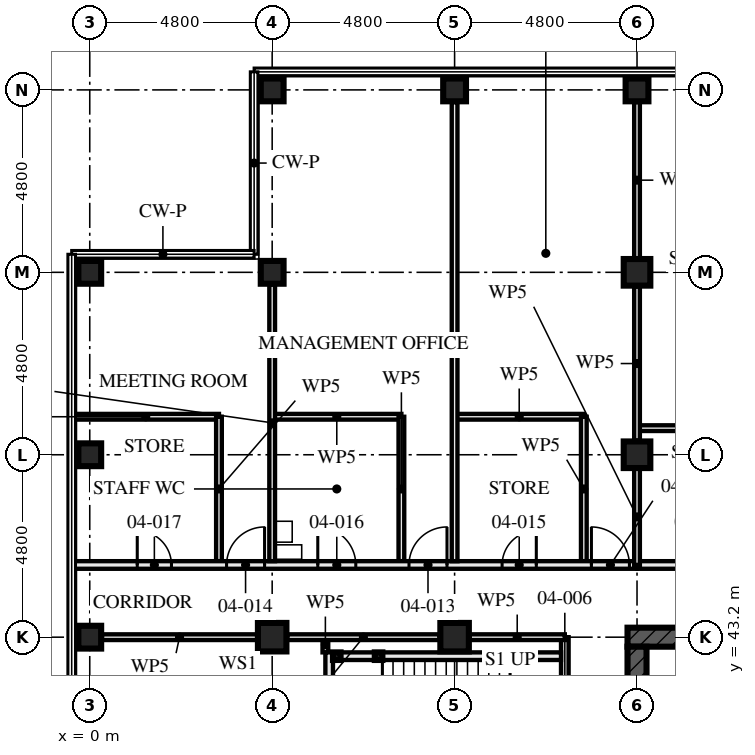
"""IFC4 building model, lengths in metres.
Left out: names, types, materials, properties, quantities, classifications, styles, units other than length and angle.
Written with IfcOpenShell. Run it as: python <this file> out.ifc"""

import sys

from ifc_helpers import new_model, si_unit, direction, frame, frame_2d, origin, origin_2d, place, context, subcontext, project, spatial, rectangle, hollow_rectangle, extrude, element, fill, save


model = new_model("IFC4")
c1 = context("Model", 3, precision=1e-05, world=origin(), true_north=direction((0.0, 1.0)))
c2 = subcontext(c1, "Body", "Model", "MODEL_VIEW")
j1 = project(units=[si_unit("LENGTHUNIT", "METRE"), si_unit("PLANEANGLEUNIT", "RADIAN")], contexts=[c1])
p1 = place(None, origin())
s1 = spatial("IfcSite", under=j1, at=p1, CompositionType="ELEMENT")
p2 = place(p1, origin())
s2 = spatial("IfcBuilding", under=s1, at=p2, CompositionType="ELEMENT")
p3 = place(p2, frame((0.0, 0.0, 18.0)))
s3 = spatial("IfcBuildingStorey", under=s2, at=p3, CompositionType="ELEMENT", Elevation=18.0)
for number, where, z_axis, x_axis in (
    (1, (0.0, 43.2, 0.0), (0.0, 0.0, 1.0), (0.0, 1.0, 0.0)),
    (2, (0.0, 48.0, 0.0), (0.0, 0.0, 1.0), (1.0, 0.0, 0.0)),
    (3, (0.0, 52.8, 0.0), (0.0, 0.0, 1.0), (0.0, 1.0, 0.0)),
):
    element("IfcColumn", number, at=place(p3, frame(where, z_axis=z_axis, x_axis=x_axis)), inside=s3, PredefinedType="COLUMN", context=c2, shape_type="SweptSolid", body=[
        extrude(hollow_rectangle(XDim=0.6, YDim=0.6, WallThickness=0.08, at=origin_2d()), origin(), (0.0, 0.0, 1.0), 4.5),
    ])
p4 = place(p3, frame((4.8, 43.2, 0.0), z_axis=(0.0, 0.0, 1.0), x_axis=(0.0, 1.0, 0.0)))
e4 = element("IfcColumn", 4, at=p4, inside=s3, PredefinedType="COLUMN", context=c2, shape_type="SweptSolid", body=[
    extrude(hollow_rectangle(XDim=0.75, YDim=0.75, WallThickness=0.08, at=origin_2d()), origin(), (0.0, 0.0, 1.0), 4.5),
])
for number, where, z_axis, x_axis in (
    (5, (4.8, 52.8, 0.0), (0.0, 0.0, 1.0), (0.0, 1.0, 0.0)),
    (6, (4.8, 57.6, 0.0), (0.0, 0.0, 1.0), (0.0, 1.0, 0.0)),
):
    element("IfcColumn", number, at=place(p3, frame(where, z_axis=z_axis, x_axis=x_axis)), inside=s3, PredefinedType="COLUMN", context=c2, shape_type="SweptSolid", body=[
        extrude(hollow_rectangle(XDim=0.6, YDim=0.6, WallThickness=0.08, at=origin_2d()), origin(), (0.0, 0.0, 1.0), 4.5),
    ])
p5 = place(p3, frame((9.6, 43.2, 0.0), z_axis=(0.0, 0.0, 1.0), x_axis=(0.0, 1.0, 0.0)))
e7 = element("IfcColumn", 7, at=p5, inside=s3, PredefinedType="COLUMN", context=c2, shape_type="SweptSolid", body=[
    extrude(hollow_rectangle(XDim=0.75, YDim=0.75, WallThickness=0.08, at=origin_2d()), origin(), (0.0, 0.0, 1.0), 4.5),
])
p6 = place(p3, frame((9.6, 57.6, 0.0), z_axis=(0.0, 0.0, 1.0), x_axis=(0.0, 1.0, 0.0)))
e8 = element("IfcColumn", 8, at=p6, inside=s3, PredefinedType="COLUMN", context=c2, shape_type="SweptSolid", body=[
    extrude(hollow_rectangle(XDim=0.6, YDim=0.6, WallThickness=0.08, at=origin_2d()), origin(), (0.0, 0.0, 1.0), 4.5),
])
for number, where, z_axis, x_axis in (
    (9, (14.4, 48.0, 0.0), (0.0, 0.0, 1.0), (1.0, 0.0, 0.0)),
    (10, (14.4, 52.8, 0.0), (0.0, 0.0, 1.0), (1.0, 0.0, 0.0)),
):
    element("IfcColumn", number, at=place(p3, frame(where, z_axis=z_axis, x_axis=x_axis)), inside=s3, PredefinedType="COLUMN", context=c2, shape_type="SweptSolid", body=[
        extrude(hollow_rectangle(XDim=0.7, YDim=0.7, WallThickness=0.06, at=origin_2d()), origin(), (0.0, 0.0, 1.0), 4.5),
    ])
p7 = place(p3, frame((14.4, 57.6, 0.0), z_axis=(0.0, 0.0, 1.0), x_axis=(0.0, 1.0, 0.0)))
e11 = element("IfcColumn", 11, at=p7, inside=s3, PredefinedType="COLUMN", context=c2, shape_type="SweptSolid", body=[
    extrude(hollow_rectangle(XDim=0.6, YDim=0.6, WallThickness=0.08, at=origin_2d()), origin(), (0.0, 0.0, 1.0), 4.5),
])
p8 = place(p3, frame((29.05, 43.2, -0.17), z_axis=(0.0, 0.0, 1.0), x_axis=(-1.0, 0.0, 0.0)))
e12 = element("IfcWall", 12, at=p8, inside=s3, PredefinedType="SHEAR", context=c2, shape_type="SweptSolid", body=[
    extrude(rectangle(XDim=14.9, YDim=0.5, at=frame_2d((7.45, 0.0))), origin(), (0.0, 0.0, 1.0), 4.5),
])
p9 = place(p8, frame((6.85, 0.0, 0.17)))
e13 = element("IfcOpeningElement", 13, at=p9, cuts=e12, PredefinedType="OPENING", context=c2, shape_type="SweptSolid", body=[
    extrude(rectangle(XDim=1.2, YDim=2.1, at=frame_2d((0.6, 1.05))), frame((0.0, 0.26, 0.0), z_axis=(0.0, -1.0, 0.0), x_axis=(1.0, 0.0, 0.0)), (0.0, 0.0, 1.0), 0.521),
])
p10 = place(p3, frame((14.4, 42.95, -0.17), z_axis=(0.0, 0.0, 1.0), x_axis=(0.0, -1.0, 0.0)))
e14 = element("IfcWall", 14, at=p10, inside=s3, PredefinedType="SHEAR", context=c2, shape_type="SweptSolid", body=[
    extrude(rectangle(XDim=13.9, YDim=0.5, at=frame_2d((6.95, 0.0))), origin(), (0.0, 0.0, 1.0), 4.5),
])
p11 = place(p10, frame((6.35, 0.0, 0.17)))
e15 = element("IfcOpeningElement", 15, at=p11, cuts=e14, PredefinedType="OPENING", context=c2, shape_type="SweptSolid", body=[
    extrude(rectangle(XDim=1.2, YDim=2.1, at=frame_2d((0.6, 1.05))), frame((0.0, 0.26, 0.0), z_axis=(0.0, -1.0, 0.0), x_axis=(1.0, 0.0, 0.0)), (0.0, 0.0, 1.0), 0.521),
])
for number, where, z_axis, x_axis in (
    (16, (6.5, 42.7, 0.0), (0.0, 0.0, 1.0), (1.0, 0.0, 0.0)),
    (17, (7.6, 42.7, 0.0), (0.0, 0.0, 1.0), (1.0, 0.0, 0.0)),
):
    element("IfcColumn", number, at=place(p3, frame(where, z_axis=z_axis, x_axis=x_axis)), inside=s3, PredefinedType="COLUMN", context=c2, shape_type="SweptSolid", body=[
        extrude(hollow_rectangle(XDim=0.2, YDim=0.2, WallThickness=0.008, at=origin_2d()), origin(), (0.0, 0.0, 1.0), 4.33),
    ])
p12 = place(p3, frame((6.6, 42.7, 0.0), z_axis=(0.0, 0.0, 1.0), x_axis=(1.0, 0.0, 0.0)))
e18 = element("IfcWall", 18, at=p12, inside=s3, PredefinedType="SOLIDWALL", context=c2, shape_type="SweptSolid", body=[
    extrude(rectangle(XDim=0.9, YDim=0.2, at=frame_2d((0.45, 0.0))), origin(), (0.0, 0.0, 1.0), 3.99),
])
p13 = place(p3, frame((7.7, 42.7, 0.0), z_axis=(0.0, 0.0, 1.0), x_axis=(1.0, 0.0, 0.0)))
e19 = element("IfcWall", 19, at=p13, inside=s3, PredefinedType="SOLIDWALL", context=c2, shape_type="SweptSolid", body=[
    extrude(rectangle(XDim=4.7, YDim=0.2, at=frame_2d((2.35, 0.0))), origin(), (0.0, 0.0, 1.0), 3.99),
])
p14 = place(p3, frame((6.3, 42.8, 0.0), z_axis=(0.0, 0.0, 1.0), x_axis=(0.0, -1.0, 0.0)))
e20 = element("IfcWall", 20, at=p14, inside=s3, PredefinedType="SOLIDWALL", context=c2, shape_type="SweptSolid", body=[
    extrude(rectangle(XDim=3.0, YDim=0.2, at=frame_2d((1.5, 0.0))), origin(), (0.0, 0.0, 1.0), 4.33),
])
p15 = place(p3, frame((6.2, 43.2, 0.0), z_axis=(0.0, 0.0, 1.0), x_axis=(0.0, -1.0, 0.0)))
e21 = element("IfcWall", 21, at=p15, inside=s3, PredefinedType="PARTITIONING", context=c2, shape_type="SweptSolid", body=[
    extrude(rectangle(XDim=0.4, YDim=0.15, at=frame_2d((0.2, 0.0))), origin(), (0.0, 0.0, 1.0), 4.33),
])
p16 = place(p3, frame((12.5, 43.2, 0.0), z_axis=(0.0, 0.0, 1.0), x_axis=(0.0, -1.0, 0.0)))
e22 = element("IfcWall", 22, at=p16, inside=s3, PredefinedType="PARTITIONING", context=c2, shape_type="SweptSolid", body=[
    extrude(rectangle(XDim=14.4, YDim=0.2, at=frame_2d((7.2, 0.0))), origin(), (0.0, 0.0, 1.0), 3.55),
])
p17 = place(p16, frame((1.4, 0.0, 0.0)))
e23 = element("IfcOpeningElement", 23, at=p17, cuts=e22, PredefinedType="OPENING", context=c2, shape_type="SweptSolid", body=[
    extrude(rectangle(XDim=1.0, YDim=2.1, at=frame_2d((0.5, 1.05))), frame((0.0, 0.111, 0.0), z_axis=(0.0, -1.0, 0.0), x_axis=(1.0, 0.0, 0.0)), (0.0, 0.0, 1.0), 0.221),
])
p18 = place(p16, frame((3.6, 0.0, 0.0)))
e24 = element("IfcOpeningElement", 24, at=p18, cuts=e22, PredefinedType="OPENING", context=c2, shape_type="SweptSolid", body=[
    extrude(rectangle(XDim=1.0, YDim=2.4, at=frame_2d((0.5, 1.2))), frame((0.0, 0.111, 0.0), z_axis=(0.0, -1.0, 0.0), x_axis=(1.0, 0.0, 0.0)), (0.0, 0.0, 1.0), 0.221),
])
p19 = place(p16, frame((5.0, 0.0, 0.0)))
e25 = element("IfcOpeningElement", 25, at=p19, cuts=e22, PredefinedType="OPENING", context=c2, shape_type="SweptSolid", body=[
    extrude(rectangle(XDim=1.0, YDim=2.4, at=frame_2d((0.5, 1.2))), frame((0.0, 0.111, 0.0), z_axis=(0.0, -1.0, 0.0), x_axis=(1.0, 0.0, 0.0)), (0.0, 0.0, 1.0), 0.221),
])
p20 = place(p16, frame((9.8, 0.0, 0.0)))
e26 = element("IfcOpeningElement", 26, at=p20, cuts=e22, PredefinedType="OPENING", context=c2, shape_type="SweptSolid", body=[
    extrude(rectangle(XDim=1.0, YDim=2.4, at=frame_2d((0.5, 1.2))), frame((0.0, 0.111, 0.0), z_axis=(0.0, -1.0, 0.0), x_axis=(1.0, 0.0, 0.0)), (0.0, 0.0, 1.0), 0.221),
])
p21 = place(p16, frame((7.45, 0.0, 0.0)))
e27 = element("IfcOpeningElement", 27, at=p21, cuts=e22, PredefinedType="OPENING", context=c2, shape_type="SweptSolid", body=[
    extrude(rectangle(XDim=0.9, YDim=2.1, at=frame_2d((0.45, 1.05))), frame((0.0, 0.111, 0.0), z_axis=(0.0, -1.0, 0.0), x_axis=(1.0, 0.0, 0.0)), (0.0, 0.0, 1.0), 0.221),
])
p22 = place(p16, frame((12.2, 0.0, 0.0)))
e28 = element("IfcOpeningElement", 28, at=p22, cuts=e22, PredefinedType="OPENING", context=c2, shape_type="SweptSolid", body=[
    extrude(rectangle(XDim=1.0, YDim=2.1, at=frame_2d((0.5, 1.05))), frame((0.0, 0.111, 0.0), z_axis=(0.0, -1.0, 0.0), x_axis=(1.0, 0.0, 0.0)), (0.0, 0.0, 1.0), 0.221),
])
p23 = place(p3, frame((13.0, 49.0, 0.0), z_axis=(0.0, 0.0, 1.0), x_axis=(0.0, -1.0, 0.0)))
e29 = element("IfcWall", 29, at=p23, inside=s3, PredefinedType="PARTITIONING", context=c2, shape_type="SweptSolid", body=[
    extrude(rectangle(XDim=3.8, YDim=0.15, at=frame_2d((1.9, 0.0))), origin(), (0.0, 0.0, 1.0), 3.55),
])
p24 = place(p3, frame((13.0, 49.0, 0.0), z_axis=(0.0, 0.0, 1.0), x_axis=(-1.0, 0.0, 0.0)))
e30 = element("IfcWall", 30, at=p24, inside=s3, PredefinedType="PARTITIONING", context=c2, shape_type="SweptSolid", body=[
    extrude(rectangle(XDim=3.4, YDim=0.15, at=frame_2d((1.7, 0.0))), origin(), (0.0, 0.0, 1.0), 4.33),
])
p25 = place(p3, frame((8.2, 49.0, 0.0), z_axis=(0.0, 0.0, 1.0), x_axis=(0.0, -1.0, 0.0)))
e31 = element("IfcWall", 31, at=p25, inside=s3, PredefinedType="PARTITIONING", context=c2, shape_type="SweptSolid", body=[
    extrude(rectangle(XDim=3.8, YDim=0.15, at=frame_2d((1.9, 0.0))), origin(), (0.0, 0.0, 1.0), 3.55),
])
p26 = place(p3, frame((8.2, 49.0, 0.0), z_axis=(0.0, 0.0, 1.0), x_axis=(-1.0, 0.0, 0.0)))
e32 = element("IfcWall", 32, at=p26, inside=s3, PredefinedType="PARTITIONING", context=c2, shape_type="SweptSolid", body=[
    extrude(rectangle(XDim=3.4, YDim=0.15, at=frame_2d((1.7, 0.0))), origin(), (0.0, 0.0, 1.0), 4.33),
])
p27 = place(p3, frame((3.4, 49.0, 0.0), z_axis=(0.0, 0.0, 1.0), x_axis=(0.0, -1.0, 0.0)))
e33 = element("IfcWall", 33, at=p27, inside=s3, PredefinedType="PARTITIONING", context=c2, shape_type="SweptSolid", body=[
    extrude(rectangle(XDim=3.8, YDim=0.15, at=frame_2d((1.9, 0.0))), origin(), (0.0, 0.0, 1.0), 3.55),
])
p28 = place(p3, frame((3.4, 49.0, 0.0), z_axis=(0.0, 0.0, 1.0), x_axis=(-1.0, 0.0, 0.0)))
e34 = element("IfcWall", 34, at=p28, inside=s3, PredefinedType="PARTITIONING", context=c2, shape_type="SweptSolid", body=[
    extrude(rectangle(XDim=3.855, YDim=0.15, at=frame_2d((1.927, 0.0))), origin(), (0.0, 0.0, 1.0), 3.32),
])
p29 = place(p3, frame((9.6, 57.28, 0.0), z_axis=(0.0, 0.0, 1.0), x_axis=(0.0, -1.0, 0.0)))
e35 = element("IfcWall", 35, at=p29, inside=s3, PredefinedType="PARTITIONING", context=c2, shape_type="SweptSolid", body=[
    extrude(rectangle(XDim=12.08, YDim=0.15, at=frame_2d((6.04, 0.0))), origin(), (0.0, 0.0, 1.0), 3.55),
])
p30 = place(p3, frame((4.8, 52.48, 0.0), z_axis=(0.0, 0.0, 1.0), x_axis=(0.0, -1.0, 0.0)))
e36 = element("IfcWall", 36, at=p30, inside=s3, PredefinedType="PARTITIONING", context=c2, shape_type="SweptSolid", body=[
    extrude(rectangle(XDim=7.28, YDim=0.15, at=frame_2d((3.64, 0.0))), origin(), (0.0, 0.0, 1.0), 3.55),
])
p31 = place(p3, frame((14.4, 45.1, 0.0), z_axis=(0.0, 0.0, 1.0), x_axis=(-1.0, 0.0, 0.0)))
e37 = element("IfcWall", 37, at=p31, inside=s3, PredefinedType="PARTITIONING", context=c2, shape_type="SweptSolid", body=[
    extrude(rectangle(XDim=14.855, YDim=0.2, at=frame_2d((7.427, 0.0))), origin(), (0.0, 0.0, 1.0), 3.32),
])
p32 = place(p31, frame((0.2, 0.0, 0.0)))
e38 = element("IfcOpeningElement", 38, at=p32, cuts=e37, PredefinedType="OPENING", context=c2, shape_type="SweptSolid", body=[
    extrude(rectangle(XDim=1.0, YDim=2.4, at=frame_2d((0.5, 1.2))), frame((0.0, 0.111, 0.0), z_axis=(0.0, -1.0, 0.0), x_axis=(1.0, 0.0, 0.0)), (0.0, 0.0, 1.0), 0.221),
])
p33 = place(p31, frame((5.0, 0.0, 0.0)))
e39 = element("IfcOpeningElement", 39, at=p33, cuts=e37, PredefinedType="OPENING", context=c2, shape_type="SweptSolid", body=[
    extrude(rectangle(XDim=1.0, YDim=2.4, at=frame_2d((0.5, 1.2))), frame((0.0, 0.111, 0.0), z_axis=(0.0, -1.0, 0.0), x_axis=(1.0, 0.0, 0.0)), (0.0, 0.0, 1.0), 0.221),
])
p34 = place(p31, frame((9.8, 0.0, 0.0)))
e40 = element("IfcOpeningElement", 40, at=p34, cuts=e37, PredefinedType="OPENING", context=c2, shape_type="SweptSolid", body=[
    extrude(rectangle(XDim=1.0, YDim=2.4, at=frame_2d((0.5, 1.2))), frame((0.0, 0.111, 0.0), z_axis=(0.0, -1.0, 0.0), x_axis=(1.0, 0.0, 0.0)), (0.0, 0.0, 1.0), 0.221),
])
p35 = place(p31, frame((2.65, 0.0, 0.0)))
e41 = element("IfcOpeningElement", 41, at=p35, cuts=e37, PredefinedType="OPENING", context=c2, shape_type="SweptSolid", body=[
    extrude(rectangle(XDim=0.9, YDim=2.1, at=frame_2d((0.45, 1.05))), frame((0.0, 0.111, 0.0), z_axis=(0.0, -1.0, 0.0), x_axis=(1.0, 0.0, 0.0)), (0.0, 0.0, 1.0), 0.221),
])
p36 = place(p31, frame((7.4, 0.0, 0.0)))
e42 = element("IfcOpeningElement", 42, at=p36, cuts=e37, PredefinedType="OPENING", context=c2, shape_type="SweptSolid", body=[
    extrude(rectangle(XDim=1.0, YDim=2.1, at=frame_2d((0.5, 1.05))), frame((0.0, 0.111, 0.0), z_axis=(0.0, -1.0, 0.0), x_axis=(1.0, 0.0, 0.0)), (0.0, 0.0, 1.0), 0.221),
])
p37 = place(p31, frame((12.25, 0.0, 0.0)))
e43 = element("IfcOpeningElement", 43, at=p37, cuts=e37, PredefinedType="OPENING", context=c2, shape_type="SweptSolid", body=[
    extrude(rectangle(XDim=0.9, YDim=2.1, at=frame_2d((0.45, 1.05))), frame((0.0, 0.111, 0.0), z_axis=(0.0, -1.0, 0.0), x_axis=(1.0, 0.0, 0.0)), (0.0, 0.0, 1.0), 0.221),
])
p38 = place(p3, frame((17.8, 48.7, 0.0), z_axis=(0.0, 0.0, 1.0), x_axis=(-1.0, 0.0, 0.0)))
e44 = element("IfcWall", 44, at=p38, inside=s3, PredefinedType="PARTITIONING", context=c2, shape_type="SweptSolid", body=[
    extrude(rectangle(XDim=3.4, YDim=0.15, at=frame_2d((1.7, 0.0))), origin(), (0.0, 0.0, 1.0), 4.33),
])
p39 = place(p3, frame((28.8, 45.1, 0.0), z_axis=(0.0, 0.0, 1.0), x_axis=(-1.0, 0.0, 0.0)))
e45 = element("IfcWall", 45, at=p39, inside=s3, PredefinedType="PARTITIONING", context=c2, shape_type="SweptSolid", body=[
    extrude(rectangle(XDim=14.4, YDim=0.2, at=frame_2d((7.2, 0.0))), origin(), (0.0, 0.0, 1.0), 4.33),
])
p40 = place(p39, frame((0.2, 0.0, 0.0)))
e46 = element("IfcOpeningElement", 46, at=p40, cuts=e45, PredefinedType="OPENING", context=c2, shape_type="SweptSolid", body=[
    extrude(rectangle(XDim=1.0, YDim=2.4, at=frame_2d((0.5, 1.2))), frame((0.0, 0.111, 0.0), z_axis=(0.0, -1.0, 0.0), x_axis=(1.0, 0.0, 0.0)), (0.0, 0.0, 1.0), 0.221),
])
p41 = place(p39, frame((5.0, 0.0, 0.0)))
e47 = element("IfcOpeningElement", 47, at=p41, cuts=e45, PredefinedType="OPENING", context=c2, shape_type="SweptSolid", body=[
    extrude(rectangle(XDim=1.0, YDim=2.4, at=frame_2d((0.5, 1.2))), frame((0.0, 0.111, 0.0), z_axis=(0.0, -1.0, 0.0), x_axis=(1.0, 0.0, 0.0)), (0.0, 0.0, 1.0), 0.221),
])
p42 = place(p39, frame((9.8, 0.0, 0.0)))
e48 = element("IfcOpeningElement", 48, at=p42, cuts=e45, PredefinedType="OPENING", context=c2, shape_type="SweptSolid", body=[
    extrude(rectangle(XDim=1.0, YDim=2.4, at=frame_2d((0.5, 1.2))), frame((0.0, 0.111, 0.0), z_axis=(0.0, -1.0, 0.0), x_axis=(1.0, 0.0, 0.0)), (0.0, 0.0, 1.0), 0.221),
])
p43 = place(p39, frame((2.65, 0.0, 0.0)))
e49 = element("IfcOpeningElement", 49, at=p43, cuts=e45, PredefinedType="OPENING", context=c2, shape_type="SweptSolid", body=[
    extrude(rectangle(XDim=0.9, YDim=2.1, at=frame_2d((0.45, 1.05))), frame((0.0, 0.111, 0.0), z_axis=(0.0, -1.0, 0.0), x_axis=(1.0, 0.0, 0.0)), (0.0, 0.0, 1.0), 0.221),
])
p44 = place(p39, frame((7.4, 0.0, 0.0)))
e50 = element("IfcOpeningElement", 50, at=p44, cuts=e45, PredefinedType="OPENING", context=c2, shape_type="SweptSolid", body=[
    extrude(rectangle(XDim=1.0, YDim=2.1, at=frame_2d((0.5, 1.05))), frame((0.0, 0.111, 0.0), z_axis=(0.0, -1.0, 0.0), x_axis=(1.0, 0.0, 0.0)), (0.0, 0.0, 1.0), 0.221),
])
p45 = place(p39, frame((12.25, 0.0, 0.0)))
e51 = element("IfcOpeningElement", 51, at=p45, cuts=e45, PredefinedType="OPENING", context=c2, shape_type="SweptSolid", body=[
    extrude(rectangle(XDim=0.9, YDim=2.1, at=frame_2d((0.45, 1.05))), frame((0.0, 0.111, 0.0), z_axis=(0.0, -1.0, 0.0), x_axis=(1.0, 0.0, 0.0)), (0.0, 0.0, 1.0), 0.221),
])
p46 = place(p3, frame((12.5, 43.2, 0.0), z_axis=(0.0, 0.0, 1.0), x_axis=(-1.0, 0.0, 0.0)))
e52 = element("IfcWall", 52, at=p46, inside=s3, PredefinedType="PARTITIONING", context=c2, shape_type="SweptSolid", body=[
    extrude(rectangle(XDim=2.505, YDim=0.15, at=frame_2d((1.252, 0.0))), origin(), (0.0, 0.0, 1.0), 3.32),
])
p47 = place(p3, frame((9.205, 43.2, 0.0), z_axis=(0.0, 0.0, 1.0), x_axis=(-1.0, 0.0, 0.0)))
e53 = element("IfcWall", 53, at=p47, inside=s3, PredefinedType="PARTITIONING", context=c2, shape_type="SweptSolid", body=[
    extrude(rectangle(XDim=4.01, YDim=0.15, at=frame_2d((2.005, 0.0))), origin(), (0.0, 0.0, 1.0), 3.32),
])
p48 = place(p3, frame((4.405, 43.2, 0.0), z_axis=(0.0, 0.0, 1.0), x_axis=(-1.0, 0.0, 0.0)))
e54 = element("IfcWall", 54, at=p48, inside=s3, PredefinedType="PARTITIONING", context=c2, shape_type="SweptSolid", body=[
    extrude(rectangle(XDim=4.085, YDim=0.15, at=frame_2d((2.042, 0.0))), origin(), (0.0, 0.0, 1.0), 3.32),
])
p49 = place(p3, frame((14.4, 45.1, 0.0), z_axis=(0.0, 0.0, 1.0), x_axis=(0.0, 1.0, 0.0)))
e55 = element("IfcWall", 55, at=p49, inside=s3, PredefinedType="PARTITIONING", context=c2, shape_type="SweptSolid", body=[
    extrude(rectangle(XDim=2.53, YDim=0.15, at=frame_2d((1.265, 0.0))), origin(), (0.0, 0.0, 1.0), 3.32),
])
p50 = place(p3, frame((14.4, 48.37, 0.0), z_axis=(0.0, 0.0, 1.0), x_axis=(0.0, 1.0, 0.0)))
e56 = element("IfcWall", 56, at=p50, inside=s3, PredefinedType="PARTITIONING", context=c2, shape_type="SweptSolid", body=[
    extrude(rectangle(XDim=4.06, YDim=0.15, at=frame_2d((2.03, 0.0))), origin(), (0.0, 0.0, 1.0), 3.32),
])
p51 = place(p3, frame((14.4, 53.17, 0.0), z_axis=(0.0, 0.0, 1.0), x_axis=(0.0, 1.0, 0.0)))
e57 = element("IfcWall", 57, at=p51, inside=s3, PredefinedType="PARTITIONING", context=c2, shape_type="SweptSolid", body=[
    extrude(rectangle(XDim=4.11, YDim=0.15, at=frame_2d((2.055, 0.0))), origin(), (0.0, 0.0, 1.0), 3.32),
])
p52 = place(p32, frame((1.0, 0.0, 0.0), z_axis=(0.0, 0.0, 1.0), x_axis=(-1.0, 0.0, 0.0)))
e58 = element("IfcDoor", 58, at=p52, inside=s3, OperationType="SINGLE_SWING_RIGHT", PredefinedType="DOOR", context=c2, shape_type="SweptSolid", body=[
    extrude(rectangle(XDim=1.0, YDim=2.4, at=frame_2d((0.5, 1.2))), frame((0.0, 0.027, 0.0), z_axis=(0.0, -1.0, 0.0), x_axis=(1.0, 0.0, 0.0)), (0.0, 0.0, 1.0), 0.054),
])
fill(e38, e58)
p53 = place(p33, frame((1.0, 0.0, 0.0), z_axis=(0.0, 0.0, 1.0), x_axis=(-1.0, 0.0, 0.0)))
e59 = element("IfcDoor", 59, at=p53, inside=s3, OperationType="SINGLE_SWING_LEFT", PredefinedType="DOOR", context=c2, shape_type="SweptSolid", body=[
    extrude(rectangle(XDim=1.0, YDim=2.4, at=frame_2d((0.5, 1.2))), frame((0.0, 0.027, 0.0), z_axis=(0.0, -1.0, 0.0), x_axis=(1.0, 0.0, 0.0)), (0.0, 0.0, 1.0), 0.054),
])
fill(e39, e59)
p54 = place(p34, frame((1.0, 0.0, 0.0), z_axis=(0.0, 0.0, 1.0), x_axis=(-1.0, 0.0, 0.0)))
e60 = element("IfcDoor", 60, at=p54, inside=s3, OperationType="SINGLE_SWING_LEFT", PredefinedType="DOOR", context=c2, shape_type="SweptSolid", body=[
    extrude(rectangle(XDim=1.0, YDim=2.4, at=frame_2d((0.5, 1.2))), frame((0.0, 0.027, 0.0), z_axis=(0.0, -1.0, 0.0), x_axis=(1.0, 0.0, 0.0)), (0.0, 0.0, 1.0), 0.054),
])
fill(e40, e60)
p55 = place(p35, frame((0.9, 0.0, 0.0), z_axis=(0.0, 0.0, 1.0), x_axis=(-1.0, 0.0, 0.0)))
e61 = element("IfcDoor", 61, at=p55, inside=s3, OperationType="SINGLE_SWING_LEFT", PredefinedType="DOOR", context=c2, shape_type="SweptSolid", body=[
    extrude(rectangle(XDim=0.9, YDim=2.1, at=frame_2d((0.45, 1.05))), frame((0.0, 0.027, 0.0), z_axis=(0.0, -1.0, 0.0), x_axis=(1.0, 0.0, 0.0)), (0.0, 0.0, 1.0), 0.054),
])
fill(e41, e61)
p56 = place(p36, frame((1.0, 0.0, 0.0), z_axis=(0.0, 0.0, 1.0), x_axis=(-1.0, 0.0, 0.0)))
e62 = element("IfcDoor", 62, at=p56, inside=s3, OperationType="SINGLE_SWING_RIGHT", PredefinedType="DOOR", context=c2, shape_type="SweptSolid", body=[
    extrude(rectangle(XDim=1.0, YDim=2.1, at=frame_2d((0.5, 1.05))), frame((0.0, 0.027, 0.0), z_axis=(0.0, -1.0, 0.0), x_axis=(1.0, 0.0, 0.0)), (0.0, 0.0, 1.0), 0.054),
])
fill(e42, e62)
p57 = place(p37, frame((0.9, 0.0, 0.0), z_axis=(0.0, 0.0, 1.0), x_axis=(-1.0, 0.0, 0.0)))
e63 = element("IfcDoor", 63, at=p57, inside=s3, OperationType="SINGLE_SWING_RIGHT", PredefinedType="DOOR", context=c2, shape_type="SweptSolid", body=[
    extrude(rectangle(XDim=0.9, YDim=2.1, at=frame_2d((0.45, 1.05))), frame((0.0, 0.027, 0.0), z_axis=(0.0, -1.0, 0.0), x_axis=(1.0, 0.0, 0.0)), (0.0, 0.0, 1.0), 0.054),
])
fill(e43, e63)
save(model, sys.argv[1])
